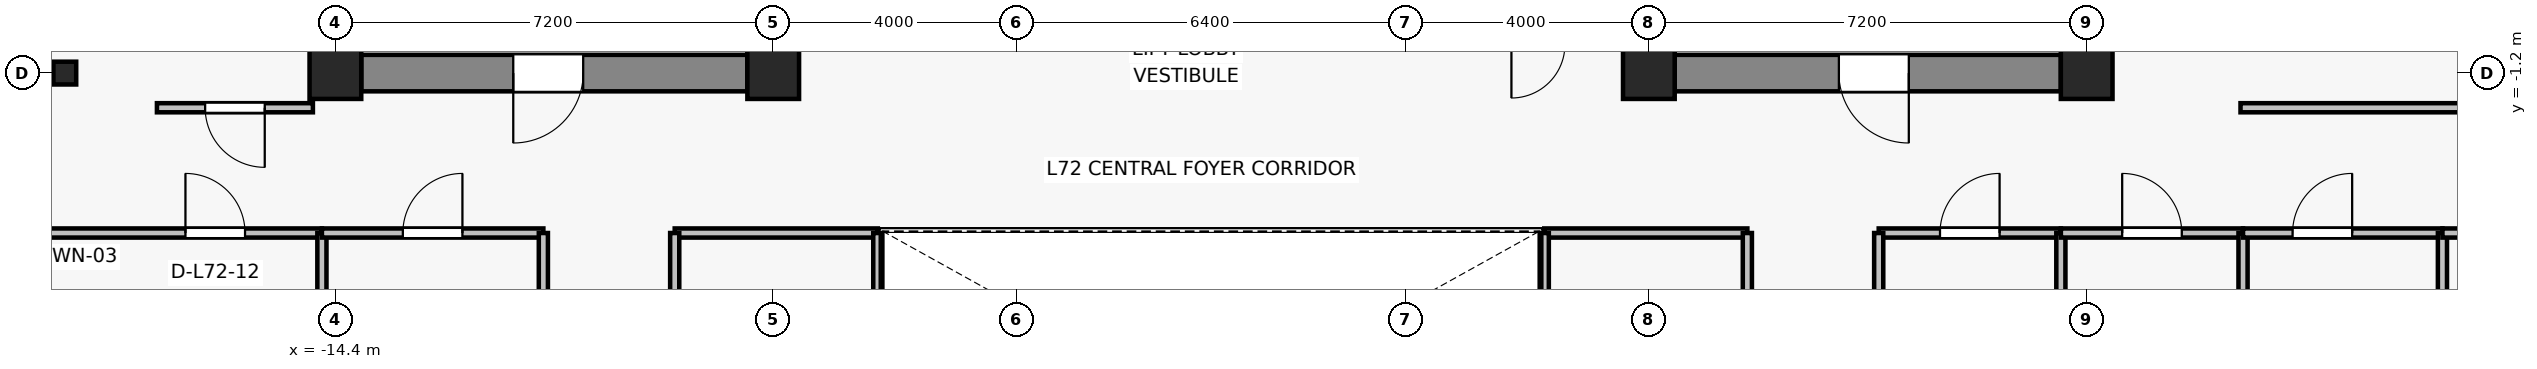
"""IFC4 building model, lengths in metres.
Left out: names, types, materials, properties, quantities, classifications, styles, units other than length and angle.
Written with IfcOpenShell. Run it as: python <this file> out.ifc"""

import sys

from ifc_helpers import new_model, si_unit, direction, frame, frame_2d, origin, origin_2d, place, context, subcontext, project, spatial, rectangle, i_section, extrude, source, transform, mapped, element, fill, save


model = new_model("IFC4")
c1 = context("Model", 3, precision=1e-05, world=origin(), true_north=direction((0.0, 1.0)))
c2 = subcontext(c1, "Body", "Model", "MODEL_VIEW")
j1 = project(units=[si_unit("LENGTHUNIT", "METRE"), si_unit("PLANEANGLEUNIT", "RADIAN")], contexts=[c1])
p1 = place(None, origin())
s1 = spatial("IfcSite", under=j1, at=p1, CompositionType="ELEMENT")
p2 = place(p1, origin())
s2 = spatial("IfcBuilding", under=s1, at=p2, CompositionType="ELEMENT")
p3 = place(p2, frame((0.0, 0.0, 255.1)))
s3 = spatial("IfcBuildingStorey", under=s2, at=p3, CompositionType="ELEMENT", Elevation=255.1)
for number, where, z_axis, x_axis in (
    (1, (-14.4, -1.2, 0.0), (0.0, 0.0, 1.0), (1.0, 0.0, 0.0)),
    (2, (-7.2, -1.2, 0.0), (0.0, 0.0, 1.0), (1.0, 0.0, 0.0)),
    (3, (7.2, -1.2, 0.0), (0.0, 0.0, 1.0), (1.0, 0.0, 0.0)),
    (4, (14.4, -1.2, 0.0), (0.0, 0.0, 1.0), (1.0, 0.0, 0.0)),
):
    element("IfcColumn", number, at=place(p3, frame(where, z_axis=z_axis, x_axis=x_axis)), inside=s3, PredefinedType="COLUMN", context=c2, shape_type="SweptSolid", body=[
        extrude(rectangle(XDim=0.85, YDim=0.85, at=origin_2d()), origin(), (0.0, 0.0, 1.0), 3.3),
    ])
p4 = place(p3, frame((-18.85, -1.2, 0.0), z_axis=(0.0, 0.0, 1.0), x_axis=(1.0, 0.0, 0.0)))
e5 = element("IfcColumn", 5, at=p4, inside=s3, PredefinedType="COLUMN", context=c2, shape_type="SweptSolid", body=[
    extrude(i_section(OverallWidth=0.375, OverallDepth=0.375, WebThickness=0.017, FlangeThickness=0.027, FilletRadius=0.015, at=origin_2d()), origin(), (0.0, 0.0, 1.0), 3.3),
])
p5 = place(p3, frame((-7.625, -1.2, 0.0), z_axis=(0.0, 0.0, 1.0), x_axis=(-1.0, 0.0, 0.0)))
e6 = element("IfcWall", 6, at=p5, inside=s3, PredefinedType="SHEAR", context=c2, shape_type="SweptSolid", body=[
    extrude(rectangle(XDim=6.35, YDim=0.6, at=frame_2d((3.175, 0.0))), origin(), (0.0, 0.0, 1.0), 3.075),
])
p6 = place(p5, frame((2.7, 0.0, 0.0)))
e7 = element("IfcOpeningElement", 7, at=p6, cuts=e6, PredefinedType="OPENING", context=c2, shape_type="SweptSolid", body=[
    extrude(rectangle(XDim=1.15, YDim=2.15, at=frame_2d((0.575, 1.075))), frame((0.0, 0.31, 0.0), z_axis=(0.0, -1.0, 0.0), x_axis=(1.0, 0.0, 0.0)), (0.0, 0.0, 1.0), 0.62),
])
p7 = place(p3, frame((13.975, -1.2, 0.0), z_axis=(0.0, 0.0, 1.0), x_axis=(-1.0, 0.0, 0.0)))
e8 = element("IfcWall", 8, at=p7, inside=s3, PredefinedType="SHEAR", context=c2, shape_type="SweptSolid", body=[
    extrude(rectangle(XDim=6.35, YDim=0.6, at=frame_2d((3.175, 0.0))), origin(), (0.0, 0.0, 1.0), 3.075),
])
p8 = place(p7, frame((2.5, 0.0, 0.0)))
e9 = element("IfcOpeningElement", 9, at=p8, cuts=e8, PredefinedType="OPENING", context=c2, shape_type="SweptSolid", body=[
    extrude(rectangle(XDim=1.15, YDim=2.15, at=frame_2d((0.575, 1.075))), frame((0.0, 0.31, 0.0), z_axis=(0.0, -1.0, 0.0), x_axis=(1.0, 0.0, 0.0)), (0.0, 0.0, 1.0), 0.62),
])
for number, where, z_axis, x_axis in (
    (10, (-7.4, -0.9, 0.0), (0.0, 0.0, 1.0), (0.0, 1.0, 0.0)),
    (11, (7.4, -0.9, 0.0), (0.0, 0.0, 1.0), (0.0, 1.0, 0.0)),
):
    element("IfcWall", number, at=place(p3, frame(where, z_axis=z_axis, x_axis=x_axis)), inside=s3, PredefinedType="SHEAR", context=c2, shape_type="SweptSolid", body=[
        extrude(rectangle(XDim=4.15, YDim=0.45, at=frame_2d((2.075, 0.0))), origin(), (0.0, 0.0, 1.0), 3.075),
    ])
p9 = place(p3, frame((-19.53, -3.83, 0.0), z_axis=(0.0, 0.0, 1.0), x_axis=(1.0, 0.0, 0.0)))
e12 = element("IfcWall", 12, at=p9, inside=s3, PredefinedType="PARTITIONING", context=c2, shape_type="SweptSolid", body=[
    extrude(rectangle(XDim=4.908, YDim=0.15, at=frame_2d((2.454, 0.0))), origin(), (0.0, 0.0, 1.0), 2.615),
])
p10 = place(p9, frame((2.664, 0.0, 0.0)))
e13 = element("IfcOpeningElement", 13, at=p10, cuts=e12, PredefinedType="OPENING", context=c2, shape_type="SweptSolid", body=[
    extrude(rectangle(XDim=0.98, YDim=2.15, at=frame_2d((0.49, 1.075))), frame((0.0, 0.085, 0.0), z_axis=(0.0, -1.0, 0.0), x_axis=(1.0, 0.0, 0.0)), (0.0, 0.0, 1.0), 0.17),
])
p11 = place(p3, frame((-14.622, -3.83, 0.0), z_axis=(0.0, 0.0, 1.0), x_axis=(0.0, -1.0, 0.0)))
e14 = element("IfcWall", 14, at=p11, inside=s3, PredefinedType="PARTITIONING", context=c2, shape_type="SweptSolid", body=[
    extrude(rectangle(XDim=3.69, YDim=0.15, at=frame_2d((1.845, 0.0))), origin(), (0.0, 0.0, 1.0), 2.615),
])
p12 = place(p3, frame((-14.622, -3.83, 0.0), z_axis=(0.0, 0.0, 1.0), x_axis=(1.0, 0.0, 0.0)))
e15 = element("IfcWall", 15, at=p12, inside=s3, PredefinedType="PARTITIONING", context=c2, shape_type="SweptSolid", body=[
    extrude(rectangle(XDim=3.642, YDim=0.15, at=frame_2d((1.821, 0.0))), origin(), (0.0, 0.0, 1.0), 2.615),
])
p13 = place(p12, frame((1.331, 0.0, 0.0)))
e16 = element("IfcOpeningElement", 16, at=p13, cuts=e15, PredefinedType="OPENING", context=c2, shape_type="SweptSolid", body=[
    extrude(rectangle(XDim=0.98, YDim=2.15, at=frame_2d((0.49, 1.075))), frame((0.0, 0.085, 0.0), z_axis=(0.0, -1.0, 0.0), x_axis=(1.0, 0.0, 0.0)), (0.0, 0.0, 1.0), 0.17),
])
p14 = place(p3, frame((-10.98, -3.83, 0.0), z_axis=(0.0, 0.0, 1.0), x_axis=(0.0, -1.0, 0.0)))
e17 = element("IfcWall", 17, at=p14, inside=s3, PredefinedType="PARTITIONING", context=c2, shape_type="SweptSolid", body=[
    extrude(rectangle(XDim=3.69, YDim=0.15, at=frame_2d((1.845, 0.0))), origin(), (0.0, 0.0, 1.0), 2.705),
])
p15 = place(p3, frame((10.98, -3.83, 0.0), z_axis=(0.0, 0.0, 1.0), x_axis=(1.0, 0.0, 0.0)))
e18 = element("IfcWall", 18, at=p15, inside=s3, PredefinedType="PARTITIONING", context=c2, shape_type="SweptSolid", body=[
    extrude(rectangle(XDim=2.996, YDim=0.15, at=frame_2d((1.498, 0.0))), origin(), (0.0, 0.0, 1.0), 3.075),
])
p16 = place(p15, frame((1.008, 0.0, 0.0)))
e19 = element("IfcOpeningElement", 19, at=p16, cuts=e18, PredefinedType="OPENING", context=c2, shape_type="SweptSolid", body=[
    extrude(rectangle(XDim=0.98, YDim=2.15, at=frame_2d((0.49, 1.075))), frame((0.0, 0.085, 0.0), z_axis=(0.0, -1.0, 0.0), x_axis=(1.0, 0.0, 0.0)), (0.0, 0.0, 1.0), 0.17),
])
for number, where, z_axis, x_axis in (
    (20, (10.98, -7.52, 0.0), (0.0, 0.0, 1.0), (0.0, 1.0, 0.0)),
    (21, (13.976, -3.83, 0.0), (0.0, 0.0, 1.0), (0.0, -1.0, 0.0)),
):
    element("IfcWall", number, at=place(p3, frame(where, z_axis=z_axis, x_axis=x_axis)), inside=s3, PredefinedType="PARTITIONING", context=c2, shape_type="SweptSolid", body=[
        extrude(rectangle(XDim=3.69, YDim=0.15, at=frame_2d((1.845, 0.0))), origin(), (0.0, 0.0, 1.0), 2.705),
    ])
p17 = place(p3, frame((13.976, -3.83, 0.0), z_axis=(0.0, 0.0, 1.0), x_axis=(1.0, 0.0, 0.0)))
e22 = element("IfcWall", 22, at=p17, inside=s3, PredefinedType="PARTITIONING", context=c2, shape_type="SweptSolid", body=[
    extrude(rectangle(XDim=2.996, YDim=0.15, at=frame_2d((1.498, 0.0))), origin(), (0.0, 0.0, 1.0), 2.615),
])
p18 = place(p17, frame((1.008, 0.0, 0.0)))
e23 = element("IfcOpeningElement", 23, at=p18, cuts=e22, PredefinedType="OPENING", context=c2, shape_type="SweptSolid", body=[
    extrude(rectangle(XDim=0.98, YDim=2.15, at=frame_2d((0.49, 1.075))), frame((0.0, 0.085, 0.0), z_axis=(0.0, -1.0, 0.0), x_axis=(1.0, 0.0, 0.0)), (0.0, 0.0, 1.0), 0.17),
])
p19 = place(p3, frame((16.971, -3.83, 0.0), z_axis=(0.0, 0.0, 1.0), x_axis=(0.0, -1.0, 0.0)))
e24 = element("IfcWall", 24, at=p19, inside=s3, PredefinedType="PARTITIONING", context=c2, shape_type="SweptSolid", body=[
    extrude(rectangle(XDim=3.69, YDim=0.15, at=frame_2d((1.845, 0.0))), origin(), (0.0, 0.0, 1.0), 2.705),
])
p20 = place(p3, frame((16.971, -3.83, 0.0), z_axis=(0.0, 0.0, 1.0), x_axis=(1.0, 0.0, 0.0)))
e25 = element("IfcWall", 25, at=p20, inside=s3, PredefinedType="PARTITIONING", context=c2, shape_type="SweptSolid", body=[
    extrude(rectangle(XDim=3.279, YDim=0.15, at=frame_2d((1.64, 0.0))), origin(), (0.0, 0.0, 1.0), 3.075),
])
p21 = place(p20, frame((0.815, 0.0, 0.0)))
e26 = element("IfcOpeningElement", 26, at=p21, cuts=e25, PredefinedType="OPENING", context=c2, shape_type="SweptSolid", body=[
    extrude(rectangle(XDim=0.98, YDim=2.15, at=frame_2d((0.49, 1.075))), frame((0.0, 0.085, 0.0), z_axis=(0.0, -1.0, 0.0), x_axis=(1.0, 0.0, 0.0)), (0.0, 0.0, 1.0), 0.17),
])
p22 = place(p3, frame((20.251, -3.83, 0.0), z_axis=(0.0, 0.0, 1.0), x_axis=(0.0, -1.0, 0.0)))
e27 = element("IfcWall", 27, at=p22, inside=s3, PredefinedType="PARTITIONING", context=c2, shape_type="SweptSolid", body=[
    extrude(rectangle(XDim=3.69, YDim=0.15, at=frame_2d((1.845, 0.0))), origin(), (0.0, 0.0, 1.0), 2.705),
])
p23 = place(p22, frame((1.435, 0.0, 0.0)))
e28 = element("IfcOpeningElement", 28, at=p23, cuts=e27, PredefinedType="OPENING", context=c2, shape_type="SweptSolid", body=[
    extrude(rectangle(XDim=0.98, YDim=2.15, at=frame_2d((0.49, 1.075))), frame((0.0, 0.085, 0.0), z_axis=(0.0, -1.0, 0.0), x_axis=(1.0, 0.0, 0.0)), (0.0, 0.0, 1.0), 0.17),
])
p24 = place(p3, frame((20.251, -3.83, 0.0), z_axis=(0.0, 0.0, 1.0), x_axis=(1.0, 0.0, 0.0)))
e29 = element("IfcWall", 29, at=p24, inside=s3, PredefinedType="PARTITIONING", context=c2, shape_type="SweptSolid", body=[
    extrude(rectangle(XDim=3.279, YDim=0.15, at=frame_2d((1.64, 0.0))), origin(), (0.0, 0.0, 1.0), 2.765),
])
p25 = place(p3, frame((-8.82, -3.83, 0.0), z_axis=(0.0, 0.0, 1.0), x_axis=(1.0, 0.0, 0.0)))
e30 = element("IfcWall", 30, at=p25, inside=s3, PredefinedType="PARTITIONING", context=c2, shape_type="SweptSolid", body=[
    extrude(rectangle(XDim=3.34, YDim=0.15, at=frame_2d((1.67, 0.0))), origin(), (0.0, 0.0, 1.0), 2.615),
])
p26 = place(p3, frame((-8.82, -7.52, 0.0), z_axis=(0.0, 0.0, 1.0), x_axis=(0.0, 1.0, 0.0)))
e31 = element("IfcWall", 31, at=p26, inside=s3, PredefinedType="PARTITIONING", context=c2, shape_type="SweptSolid", body=[
    extrude(rectangle(XDim=3.69, YDim=0.15, at=frame_2d((1.845, 0.0))), origin(), (0.0, 0.0, 1.0), 2.705),
])
p27 = place(p26, frame((1.355, 0.0, 0.0)))
e32 = element("IfcOpeningElement", 32, at=p27, cuts=e31, PredefinedType="OPENING", context=c2, shape_type="SweptSolid", body=[
    extrude(rectangle(XDim=0.98, YDim=2.15, at=frame_2d((0.49, 1.075))), frame((0.0, 0.085, 0.0), z_axis=(0.0, -1.0, 0.0), x_axis=(1.0, 0.0, 0.0)), (0.0, 0.0, 1.0), 0.17),
])
p28 = place(p3, frame((-5.48, -3.83, 0.0), z_axis=(0.0, 0.0, 1.0), x_axis=(0.0, -1.0, 0.0)))
e33 = element("IfcWall", 33, at=p28, inside=s3, PredefinedType="PARTITIONING", context=c2, shape_type="SweptSolid", body=[
    extrude(rectangle(XDim=3.69, YDim=0.15, at=frame_2d((1.845, 0.0))), origin(), (0.0, 0.0, 1.0), 3.075),
])
p29 = place(p3, frame((5.48, -3.83, 0.0), z_axis=(0.0, 0.0, 1.0), x_axis=(1.0, 0.0, 0.0)))
e34 = element("IfcWall", 34, at=p29, inside=s3, PredefinedType="PARTITIONING", context=c2, shape_type="SweptSolid", body=[
    extrude(rectangle(XDim=3.34, YDim=0.15, at=frame_2d((1.67, 0.0))), origin(), (0.0, 0.0, 1.0), 2.615),
])
p30 = place(p3, frame((5.48, -7.52, 0.0), z_axis=(0.0, 0.0, 1.0), x_axis=(0.0, 1.0, 0.0)))
e35 = element("IfcWall", 35, at=p30, inside=s3, PredefinedType="PARTITIONING", context=c2, shape_type="SweptSolid", body=[
    extrude(rectangle(XDim=3.69, YDim=0.15, at=frame_2d((1.845, 0.0))), origin(), (0.0, 0.0, 1.0), 3.075),
])
p31 = place(p3, frame((8.82, -3.83, 0.0), z_axis=(0.0, 0.0, 1.0), x_axis=(0.0, -1.0, 0.0)))
e36 = element("IfcWall", 36, at=p31, inside=s3, PredefinedType="PARTITIONING", context=c2, shape_type="SweptSolid", body=[
    extrude(rectangle(XDim=3.69, YDim=0.15, at=frame_2d((1.845, 0.0))), origin(), (0.0, 0.0, 1.0), 2.705),
])
p32 = place(p31, frame((1.355, 0.0, 0.0)))
e37 = element("IfcOpeningElement", 37, at=p32, cuts=e36, PredefinedType="OPENING", context=c2, shape_type="SweptSolid", body=[
    extrude(rectangle(XDim=0.98, YDim=2.15, at=frame_2d((0.49, 1.075))), frame((0.0, 0.085, 0.0), z_axis=(0.0, -1.0, 0.0), x_axis=(1.0, 0.0, 0.0)), (0.0, 0.0, 1.0), 0.17),
])
p33 = place(p3, frame((-14.77, -1.77, 0.0), z_axis=(0.0, 0.0, 1.0), x_axis=(-1.0, 0.0, 0.0)))
e38 = element("IfcWall", 38, at=p33, inside=s3, PredefinedType="PARTITIONING", context=c2, shape_type="SweptSolid", body=[
    extrude(rectangle(XDim=2.565, YDim=0.15, at=frame_2d((1.282, 0.0))), origin(), (0.0, 0.0, 1.0), 3.075),
])
p34 = place(p33, frame((0.792, 0.0, 0.0)))
e39 = element("IfcOpeningElement", 39, at=p34, cuts=e38, PredefinedType="OPENING", context=c2, shape_type="SweptSolid", body=[
    extrude(rectangle(XDim=0.98, YDim=2.15, at=frame_2d((0.49, 1.075))), frame((0.0, 0.085, 0.0), z_axis=(0.0, -1.0, 0.0), x_axis=(1.0, 0.0, 0.0)), (0.0, 0.0, 1.0), 0.17),
])
p35 = place(p3, frame((23.53, -1.77, 0.0), z_axis=(0.0, 0.0, 1.0), x_axis=(-1.0, 0.0, 0.0)))
e40 = element("IfcWall", 40, at=p35, inside=s3, PredefinedType="PARTITIONING", context=c2, shape_type="SweptSolid", body=[
    extrude(rectangle(XDim=6.6, YDim=0.15, at=frame_2d((3.3, 0.0))), origin(), (0.0, 0.0, 1.0), 2.765),
])
m1 = source(origin(), c2, "Body", "SweptSolid", [
    extrude(rectangle(XDim=1.15, YDim=2.15, at=frame_2d((0.575, 1.075))), frame((0.0, 0.025, 0.0), z_axis=(0.0, -1.0, 0.0), x_axis=(1.0, 0.0, 0.0)), (0.0, 0.0, 1.0), 0.05),
])
p36 = place(p6, origin())
e41 = element("IfcDoor", 41, at=p36, inside=s3, OperationType="SINGLE_SWING_RIGHT", PredefinedType="DOOR", context=c2, shape_type="MappedRepresentation", body=[
    mapped(m1, transform((0.0, 0.0, 0.0), x_axis=(1.0, 0.0, 0.0), y_axis=(0.0, 1.0, 0.0), z_axis=(0.0, 0.0, 1.0), scale=1.0)),
])
fill(e7, e41)
p37 = place(p8, origin())
e42 = element("IfcDoor", 42, at=p37, inside=s3, OperationType="SINGLE_SWING_LEFT", PredefinedType="DOOR", context=c2, shape_type="MappedRepresentation", body=[
    mapped(m1, transform((0.0, 0.0, 0.0), x_axis=(1.0, 0.0, 0.0), y_axis=(0.0, 1.0, 0.0), z_axis=(0.0, 0.0, 1.0), scale=1.0)),
])
fill(e9, e42)
m2 = source(origin(), c2, "Body", "SweptSolid", [
    extrude(rectangle(XDim=0.98, YDim=2.15, at=frame_2d((0.49, 1.075))), frame((0.0, 0.025, 0.0), z_axis=(0.0, -1.0, 0.0), x_axis=(1.0, 0.0, 0.0)), (0.0, 0.0, 1.0), 0.05),
])
p38 = place(p10, origin())
e43 = element("IfcDoor", 43, at=p38, inside=s3, OperationType="SINGLE_SWING_LEFT", PredefinedType="DOOR", context=c2, shape_type="MappedRepresentation", body=[
    mapped(m2, transform((0.0, 0.0, 0.0), x_axis=(1.0, 0.0, 0.0), y_axis=(0.0, 1.0, 0.0), z_axis=(0.0, 0.0, 1.0), scale=1.0)),
])
fill(e13, e43)
p39 = place(p13, origin())
e44 = element("IfcDoor", 44, at=p39, inside=s3, OperationType="SINGLE_SWING_RIGHT", PredefinedType="DOOR", context=c2, shape_type="MappedRepresentation", body=[
    mapped(m2, transform((0.0, 0.0, 0.0), x_axis=(1.0, 0.0, 0.0), y_axis=(0.0, 1.0, 0.0), z_axis=(0.0, 0.0, 1.0), scale=1.0)),
])
fill(e16, e44)
p40 = place(p16, origin())
e45 = element("IfcDoor", 45, at=p40, inside=s3, OperationType="SINGLE_SWING_RIGHT", PredefinedType="DOOR", context=c2, shape_type="MappedRepresentation", body=[
    mapped(m2, transform((0.0, 0.0, 0.0), x_axis=(1.0, 0.0, 0.0), y_axis=(0.0, 1.0, 0.0), z_axis=(0.0, 0.0, 1.0), scale=1.0)),
])
fill(e19, e45)
p41 = place(p18, origin())
e46 = element("IfcDoor", 46, at=p41, inside=s3, OperationType="SINGLE_SWING_LEFT", PredefinedType="DOOR", context=c2, shape_type="MappedRepresentation", body=[
    mapped(m2, transform((0.0, 0.0, 0.0), x_axis=(1.0, 0.0, 0.0), y_axis=(0.0, 1.0, 0.0), z_axis=(0.0, 0.0, 1.0), scale=1.0)),
])
fill(e23, e46)
p42 = place(p21, origin())
e47 = element("IfcDoor", 47, at=p42, inside=s3, OperationType="SINGLE_SWING_RIGHT", PredefinedType="DOOR", context=c2, shape_type="MappedRepresentation", body=[
    mapped(m2, transform((0.0, 0.0, 0.0), x_axis=(1.0, 0.0, 0.0), y_axis=(0.0, 1.0, 0.0), z_axis=(0.0, 0.0, 1.0), scale=1.0)),
])
fill(e26, e47)
p43 = place(p34, origin())
e48 = element("IfcDoor", 48, at=p43, inside=s3, OperationType="SINGLE_SWING_LEFT", PredefinedType="DOOR", context=c2, shape_type="MappedRepresentation", body=[
    mapped(m2, transform((0.0, 0.0, 0.0), x_axis=(1.0, 0.0, 0.0), y_axis=(0.0, 1.0, 0.0), z_axis=(0.0, 0.0, 1.0), scale=1.0)),
])
fill(e39, e48)
save(model, sys.argv[1])
